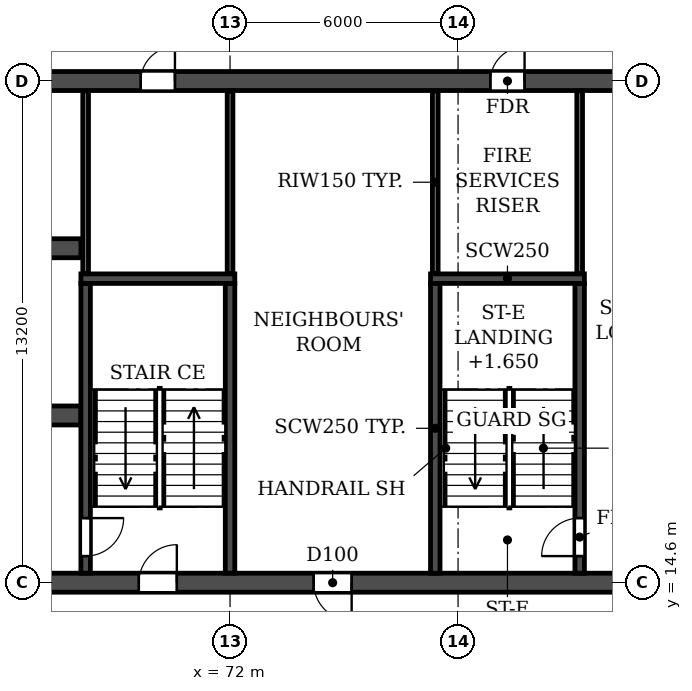
"""IFC4 building model, lengths in metres.
Left out: names, types, materials, properties, quantities, classifications, styles, units other than length and angle.
Written with IfcOpenShell. Run it as: python <this file> out.ifc"""

import sys

from ifc_helpers import new_model, si_unit, direction, frame, frame_2d, origin, place, context, subcontext, project, spatial, rectangle, extrude, element, fill, save


model = new_model("IFC4")
c1 = context("Model", 3, precision=1e-05, world=origin(), true_north=direction((0.0, 1.0)))
c2 = subcontext(c1, "Body", "Model", "MODEL_VIEW")
j1 = project(units=[si_unit("LENGTHUNIT", "METRE"), si_unit("PLANEANGLEUNIT", "RADIAN")], contexts=[c1])
p1 = place(None, origin())
s1 = spatial("IfcSite", under=j1, at=p1, CompositionType="ELEMENT")
p2 = place(p1, origin())
s2 = spatial("IfcBuilding", under=s1, at=p2, CompositionType="ELEMENT")
p3 = place(p2, frame((0.0, 0.0, 82.8)))
s3 = spatial("IfcBuildingStorey", under=s2, at=p3, CompositionType="ELEMENT", Elevation=82.8)
p4 = place(p3, frame((8.6, 14.6, 0.0), z_axis=(0.0, 0.0, 1.0), x_axis=(1.0, 0.0, 0.0)))
e1 = element("IfcWall", 1, at=p4, inside=s3, PredefinedType="SOLIDWALL", context=c2, shape_type="SweptSolid", body=[
    extrude(rectangle(XDim=84.8, YDim=0.5, at=frame_2d((42.4, 0.0))), origin(), (0.0, 0.0, 1.0), 3.06),
])
p5 = place(p4, frame((1.2, 0.0, 0.0)))
e2 = element("IfcOpeningElement", 2, at=p5, cuts=e1, PredefinedType="OPENING", context=c2, shape_type="SweptSolid", body=[
    extrude(rectangle(XDim=1.0, YDim=2.1, at=frame_2d((0.5, 1.05))), frame((0.0, 0.26, 0.0), z_axis=(0.0, -1.0, 0.0), x_axis=(1.0, 0.0, 0.0)), (0.0, 0.0, 1.0), 0.52),
])
p6 = place(p4, frame((5.9, 0.0, 0.0)))
e3 = element("IfcOpeningElement", 3, at=p6, cuts=e1, PredefinedType="OPENING", context=c2, shape_type="SweptSolid", body=[
    extrude(rectangle(XDim=1.0, YDim=2.1, at=frame_2d((0.5, 1.05))), frame((0.0, 0.26, 0.0), z_axis=(0.0, -1.0, 0.0), x_axis=(1.0, 0.0, 0.0)), (0.0, 0.0, 1.0), 0.52),
])
p7 = place(p4, frame((10.3, 0.0, 0.0)))
e4 = element("IfcOpeningElement", 4, at=p7, cuts=e1, PredefinedType="OPENING", context=c2, shape_type="SweptSolid", body=[
    extrude(rectangle(XDim=1.0, YDim=2.1, at=frame_2d((0.5, 1.05))), frame((0.0, 0.26, 0.0), z_axis=(0.0, -1.0, 0.0), x_axis=(1.0, 0.0, 0.0)), (0.0, 0.0, 1.0), 0.52),
])
p8 = place(p4, frame((18.2, 0.0, 0.0)))
e5 = element("IfcOpeningElement", 5, at=p8, cuts=e1, PredefinedType="OPENING", context=c2, shape_type="SweptSolid", body=[
    extrude(rectangle(XDim=1.0, YDim=2.1, at=frame_2d((0.5, 1.05))), frame((0.0, 0.26, 0.0), z_axis=(0.0, -1.0, 0.0), x_axis=(1.0, 0.0, 0.0)), (0.0, 0.0, 1.0), 0.52),
])
p9 = place(p4, frame((22.8, 0.0, 0.0)))
e6 = element("IfcOpeningElement", 6, at=p9, cuts=e1, PredefinedType="OPENING", context=c2, shape_type="SweptSolid", body=[
    extrude(rectangle(XDim=1.0, YDim=2.1, at=frame_2d((0.5, 1.05))), frame((0.0, 0.26, 0.0), z_axis=(0.0, -1.0, 0.0), x_axis=(1.0, 0.0, 0.0)), (0.0, 0.0, 1.0), 0.52),
])
p10 = place(p4, frame((36.7, 0.0, 0.0)))
e7 = element("IfcOpeningElement", 7, at=p10, cuts=e1, PredefinedType="OPENING", context=c2, shape_type="SweptSolid", body=[
    extrude(rectangle(XDim=1.0, YDim=2.1, at=frame_2d((0.5, 1.05))), frame((0.0, 0.26, 0.0), z_axis=(0.0, -1.0, 0.0), x_axis=(1.0, 0.0, 0.0)), (0.0, 0.0, 1.0), 0.52),
])
p11 = place(p4, frame((41.9, 0.0, 0.0)))
e8 = element("IfcOpeningElement", 8, at=p11, cuts=e1, PredefinedType="OPENING", context=c2, shape_type="SweptSolid", body=[
    extrude(rectangle(XDim=1.0, YDim=2.1, at=frame_2d((0.5, 1.05))), frame((0.0, 0.26, 0.0), z_axis=(0.0, -1.0, 0.0), x_axis=(1.0, 0.0, 0.0)), (0.0, 0.0, 1.0), 0.52),
])
p12 = place(p4, frame((44.5, 0.0, 0.0)))
e9 = element("IfcOpeningElement", 9, at=p12, cuts=e1, PredefinedType="OPENING", context=c2, shape_type="SweptSolid", body=[
    extrude(rectangle(XDim=1.0, YDim=2.1, at=frame_2d((0.5, 1.05))), frame((0.0, 0.26, 0.0), z_axis=(0.0, -1.0, 0.0), x_axis=(1.0, 0.0, 0.0)), (0.0, 0.0, 1.0), 0.52),
])
p13 = place(p4, frame((48.4, 0.0, 0.0)))
e10 = element("IfcOpeningElement", 10, at=p13, cuts=e1, PredefinedType="OPENING", context=c2, shape_type="SweptSolid", body=[
    extrude(rectangle(XDim=1.0, YDim=2.1, at=frame_2d((0.5, 1.05))), frame((0.0, 0.26, 0.0), z_axis=(0.0, -1.0, 0.0), x_axis=(1.0, 0.0, 0.0)), (0.0, 0.0, 1.0), 0.52),
])
p14 = place(p4, frame((61.0, 0.0, 0.0)))
e11 = element("IfcOpeningElement", 11, at=p14, cuts=e1, PredefinedType="OPENING", context=c2, shape_type="SweptSolid", body=[
    extrude(rectangle(XDim=1.0, YDim=2.1, at=frame_2d((0.5, 1.05))), frame((0.0, 0.26, 0.0), z_axis=(0.0, -1.0, 0.0), x_axis=(1.0, 0.0, 0.0)), (0.0, 0.0, 1.0), 0.52),
])
p15 = place(p4, frame((65.6, 0.0, 0.0)))
e12 = element("IfcOpeningElement", 12, at=p15, cuts=e1, PredefinedType="OPENING", context=c2, shape_type="SweptSolid", body=[
    extrude(rectangle(XDim=1.0, YDim=2.1, at=frame_2d((0.5, 1.05))), frame((0.0, 0.26, 0.0), z_axis=(0.0, -1.0, 0.0), x_axis=(1.0, 0.0, 0.0)), (0.0, 0.0, 1.0), 0.52),
])
p16 = place(p4, frame((73.5, 0.0, 0.0)))
e13 = element("IfcOpeningElement", 13, at=p16, cuts=e1, PredefinedType="OPENING", context=c2, shape_type="SweptSolid", body=[
    extrude(rectangle(XDim=1.0, YDim=2.1, at=frame_2d((0.5, 1.05))), frame((0.0, 0.26, 0.0), z_axis=(0.0, -1.0, 0.0), x_axis=(1.0, 0.0, 0.0)), (0.0, 0.0, 1.0), 0.52),
])
p17 = place(p4, frame((77.3, 0.0, 0.0)))
e14 = element("IfcOpeningElement", 14, at=p17, cuts=e1, PredefinedType="OPENING", context=c2, shape_type="SweptSolid", body=[
    extrude(rectangle(XDim=1.0, YDim=2.1, at=frame_2d((0.5, 1.05))), frame((0.0, 0.26, 0.0), z_axis=(0.0, -1.0, 0.0), x_axis=(1.0, 0.0, 0.0)), (0.0, 0.0, 1.0), 0.52),
])
p18 = place(p4, frame((82.0, 0.0, 0.0)))
e15 = element("IfcOpeningElement", 15, at=p18, cuts=e1, PredefinedType="OPENING", context=c2, shape_type="SweptSolid", body=[
    extrude(rectangle(XDim=1.0, YDim=2.1, at=frame_2d((0.5, 1.05))), frame((0.0, 0.26, 0.0), z_axis=(0.0, -1.0, 0.0), x_axis=(1.0, 0.0, 0.0)), (0.0, 0.0, 1.0), 0.52),
])
p19 = place(p3, frame((8.6, 27.8, 0.0), z_axis=(0.0, 0.0, 1.0), x_axis=(1.0, 0.0, 0.0)))
e16 = element("IfcWall", 16, at=p19, inside=s3, PredefinedType="SOLIDWALL", context=c2, shape_type="SweptSolid", body=[
    extrude(rectangle(XDim=84.8, YDim=0.5, at=frame_2d((42.4, 0.0))), origin(), (0.0, 0.0, 1.0), 3.06),
])
p20 = place(p19, frame((2.55, 0.0, 0.0)))
e17 = element("IfcOpeningElement", 17, at=p20, cuts=e16, PredefinedType="OPENING", context=c2, shape_type="SweptSolid", body=[
    extrude(rectangle(XDim=1.0, YDim=2.1, at=frame_2d((0.5, 1.05))), frame((0.0, 0.26, 0.0), z_axis=(0.0, -1.0, 0.0), x_axis=(1.0, 0.0, 0.0)), (0.0, 0.0, 1.0), 0.52),
])
p21 = place(p19, frame((7.25, 0.0, 0.0)))
e18 = element("IfcOpeningElement", 18, at=p21, cuts=e16, PredefinedType="OPENING", context=c2, shape_type="SweptSolid", body=[
    extrude(rectangle(XDim=1.0, YDim=2.1, at=frame_2d((0.5, 1.05))), frame((0.0, 0.26, 0.0), z_axis=(0.0, -1.0, 0.0), x_axis=(1.0, 0.0, 0.0)), (0.0, 0.0, 1.0), 0.52),
])
p22 = place(p19, frame((10.3, 0.0, 0.0)))
e19 = element("IfcOpeningElement", 19, at=p22, cuts=e16, PredefinedType="OPENING", context=c2, shape_type="SweptSolid", body=[
    extrude(rectangle(XDim=1.0, YDim=2.1, at=frame_2d((0.5, 1.05))), frame((0.0, 0.26, 0.0), z_axis=(0.0, -1.0, 0.0), x_axis=(1.0, 0.0, 0.0)), (0.0, 0.0, 1.0), 0.52),
])
p23 = place(p19, frame((13.65, 0.0, 0.0)))
e20 = element("IfcOpeningElement", 20, at=p23, cuts=e16, PredefinedType="OPENING", context=c2, shape_type="SweptSolid", body=[
    extrude(rectangle(XDim=0.9, YDim=2.1, at=frame_2d((0.45, 1.05))), frame((0.0, 0.26, 0.0), z_axis=(0.0, -1.0, 0.0), x_axis=(1.0, 0.0, 0.0)), (0.0, 0.0, 1.0), 0.52),
])
p24 = place(p19, frame((22.85, 0.0, 0.0)))
e21 = element("IfcOpeningElement", 21, at=p24, cuts=e16, PredefinedType="OPENING", context=c2, shape_type="SweptSolid", body=[
    extrude(rectangle(XDim=0.9, YDim=2.1, at=frame_2d((0.45, 1.05))), frame((0.0, 0.26, 0.0), z_axis=(0.0, -1.0, 0.0), x_axis=(1.0, 0.0, 0.0)), (0.0, 0.0, 1.0), 0.52),
])
p25 = place(p19, frame((27.3, 0.0, 0.0)))
e22 = element("IfcOpeningElement", 22, at=p25, cuts=e16, PredefinedType="OPENING", context=c2, shape_type="SweptSolid", body=[
    extrude(rectangle(XDim=1.0, YDim=2.1, at=frame_2d((0.5, 1.05))), frame((0.0, 0.26, 0.0), z_axis=(0.0, -1.0, 0.0), x_axis=(1.0, 0.0, 0.0)), (0.0, 0.0, 1.0), 0.52),
])
p26 = place(p19, frame((32.25, 0.0, 0.0)))
e23 = element("IfcOpeningElement", 23, at=p26, cuts=e16, PredefinedType="OPENING", context=c2, shape_type="SweptSolid", body=[
    extrude(rectangle(XDim=1.5, YDim=2.1, at=frame_2d((0.75, 1.05))), frame((0.0, 0.26, 0.0), z_axis=(0.0, -1.0, 0.0), x_axis=(1.0, 0.0, 0.0)), (0.0, 0.0, 1.0), 0.52),
])
p27 = place(p19, frame((39.0, 0.0, 0.0)))
e24 = element("IfcOpeningElement", 24, at=p27, cuts=e16, PredefinedType="OPENING", context=c2, shape_type="SweptSolid", body=[
    extrude(rectangle(XDim=1.0, YDim=2.1, at=frame_2d((0.5, 1.05))), frame((0.0, 0.26, 0.0), z_axis=(0.0, -1.0, 0.0), x_axis=(1.0, 0.0, 0.0)), (0.0, 0.0, 1.0), 0.52),
])
p28 = place(p19, frame((41.9, 0.0, 0.0)))
e25 = element("IfcOpeningElement", 25, at=p28, cuts=e16, PredefinedType="OPENING", context=c2, shape_type="SweptSolid", body=[
    extrude(rectangle(XDim=1.0, YDim=2.1, at=frame_2d((0.5, 1.05))), frame((0.0, 0.26, 0.0), z_axis=(0.0, -1.0, 0.0), x_axis=(1.0, 0.0, 0.0)), (0.0, 0.0, 1.0), 0.52),
])
p29 = place(p19, frame((47.4, 0.0, 0.0)))
e26 = element("IfcOpeningElement", 26, at=p29, cuts=e16, PredefinedType="OPENING", context=c2, shape_type="SweptSolid", body=[
    extrude(rectangle(XDim=1.0, YDim=2.1, at=frame_2d((0.5, 1.05))), frame((0.0, 0.26, 0.0), z_axis=(0.0, -1.0, 0.0), x_axis=(1.0, 0.0, 0.0)), (0.0, 0.0, 1.0), 0.52),
])
p30 = place(p19, frame((52.6, 0.0, 0.0)))
e27 = element("IfcOpeningElement", 27, at=p30, cuts=e16, PredefinedType="OPENING", context=c2, shape_type="SweptSolid", body=[
    extrude(rectangle(XDim=1.0, YDim=2.1, at=frame_2d((0.5, 1.05))), frame((0.0, 0.26, 0.0), z_axis=(0.0, -1.0, 0.0), x_axis=(1.0, 0.0, 0.0)), (0.0, 0.0, 1.0), 0.52),
])
p31 = place(p19, frame((56.5, 0.0, 0.0)))
e28 = element("IfcOpeningElement", 28, at=p31, cuts=e16, PredefinedType="OPENING", context=c2, shape_type="SweptSolid", body=[
    extrude(rectangle(XDim=1.0, YDim=2.1, at=frame_2d((0.5, 1.05))), frame((0.0, 0.26, 0.0), z_axis=(0.0, -1.0, 0.0), x_axis=(1.0, 0.0, 0.0)), (0.0, 0.0, 1.0), 0.52),
])
p32 = place(p19, frame((61.05, 0.0, 0.0)))
e29 = element("IfcOpeningElement", 29, at=p32, cuts=e16, PredefinedType="OPENING", context=c2, shape_type="SweptSolid", body=[
    extrude(rectangle(XDim=0.9, YDim=2.1, at=frame_2d((0.45, 1.05))), frame((0.0, 0.26, 0.0), z_axis=(0.0, -1.0, 0.0), x_axis=(1.0, 0.0, 0.0)), (0.0, 0.0, 1.0), 0.52),
])
p33 = place(p19, frame((70.25, 0.0, 0.0)))
e30 = element("IfcOpeningElement", 30, at=p33, cuts=e16, PredefinedType="OPENING", context=c2, shape_type="SweptSolid", body=[
    extrude(rectangle(XDim=0.9, YDim=2.1, at=frame_2d((0.45, 1.05))), frame((0.0, 0.26, 0.0), z_axis=(0.0, -1.0, 0.0), x_axis=(1.0, 0.0, 0.0)), (0.0, 0.0, 1.0), 0.52),
])
p34 = place(p19, frame((73.5, 0.0, 0.0)))
e31 = element("IfcOpeningElement", 31, at=p34, cuts=e16, PredefinedType="OPENING", context=c2, shape_type="SweptSolid", body=[
    extrude(rectangle(XDim=1.0, YDim=2.1, at=frame_2d((0.5, 1.05))), frame((0.0, 0.26, 0.0), z_axis=(0.0, -1.0, 0.0), x_axis=(1.0, 0.0, 0.0)), (0.0, 0.0, 1.0), 0.52),
])
p35 = place(p19, frame((76.55, 0.0, 0.0)))
e32 = element("IfcOpeningElement", 32, at=p35, cuts=e16, PredefinedType="OPENING", context=c2, shape_type="SweptSolid", body=[
    extrude(rectangle(XDim=1.0, YDim=2.1, at=frame_2d((0.5, 1.05))), frame((0.0, 0.26, 0.0), z_axis=(0.0, -1.0, 0.0), x_axis=(1.0, 0.0, 0.0)), (0.0, 0.0, 1.0), 0.52),
])
p36 = place(p19, frame((81.25, 0.0, 0.0)))
e33 = element("IfcOpeningElement", 33, at=p36, cuts=e16, PredefinedType="OPENING", context=c2, shape_type="SweptSolid", body=[
    extrude(rectangle(XDim=1.0, YDim=2.1, at=frame_2d((0.5, 1.05))), frame((0.0, 0.26, 0.0), z_axis=(0.0, -1.0, 0.0), x_axis=(1.0, 0.0, 0.0)), (0.0, 0.0, 1.0), 0.52),
])
p37 = place(p3, frame((33.925, 19.0, 0.0), z_axis=(0.0, 0.0, 1.0), x_axis=(1.0, 0.0, 0.0)))
e34 = element("IfcWall", 34, at=p37, inside=s3, PredefinedType="SOLIDWALL", context=c2, shape_type="SweptSolid", body=[
    extrude(rectangle(XDim=34.15, YDim=0.5, at=frame_2d((17.075, 0.0))), origin(), (0.0, 0.0, 1.0), 3.06),
])
p38 = place(p37, frame((16.175, 0.0, 0.0)))
e35 = element("IfcOpeningElement", 35, at=p38, cuts=e34, PredefinedType="OPENING", context=c2, shape_type="SweptSolid", body=[
    extrude(rectangle(XDim=1.8, YDim=2.1, at=frame_2d((0.9, 1.05))), frame((0.0, 0.26, 0.0), z_axis=(0.0, -1.0, 0.0), x_axis=(1.0, 0.0, 0.0)), (0.0, 0.0, 1.0), 0.52),
])
p39 = place(p37, frame((1.525, 0.0, 0.0)))
e36 = element("IfcOpeningElement", 36, at=p39, cuts=e34, PredefinedType="OPENING", context=c2, shape_type="SweptSolid", body=[
    extrude(rectangle(XDim=1.8, YDim=2.1, at=frame_2d((0.9, 1.05))), frame((0.0, 0.26, 0.0), z_axis=(0.0, -1.0, 0.0), x_axis=(1.0, 0.0, 0.0)), (0.0, 0.0, 1.0), 0.52),
])
p40 = place(p37, frame((8.725, 0.0, 0.0)))
e37 = element("IfcOpeningElement", 37, at=p40, cuts=e34, PredefinedType="OPENING", context=c2, shape_type="SweptSolid", body=[
    extrude(rectangle(XDim=1.1, YDim=2.1, at=frame_2d((0.55, 1.05))), frame((0.0, 0.26, 0.0), z_axis=(0.0, -1.0, 0.0), x_axis=(1.0, 0.0, 0.0)), (0.0, 0.0, 1.0), 0.52),
])
p41 = place(p37, frame((11.325, 0.0, 0.0)))
e38 = element("IfcOpeningElement", 38, at=p41, cuts=e34, PredefinedType="OPENING", context=c2, shape_type="SweptSolid", body=[
    extrude(rectangle(XDim=1.1, YDim=2.1, at=frame_2d((0.55, 1.05))), frame((0.0, 0.26, 0.0), z_axis=(0.0, -1.0, 0.0), x_axis=(1.0, 0.0, 0.0)), (0.0, 0.0, 1.0), 0.52),
])
p42 = place(p37, frame((13.925, 0.0, 0.0)))
e39 = element("IfcOpeningElement", 39, at=p42, cuts=e34, PredefinedType="OPENING", context=c2, shape_type="SweptSolid", body=[
    extrude(rectangle(XDim=1.1, YDim=2.1, at=frame_2d((0.55, 1.05))), frame((0.0, 0.26, 0.0), z_axis=(0.0, -1.0, 0.0), x_axis=(1.0, 0.0, 0.0)), (0.0, 0.0, 1.0), 0.52),
])
p43 = place(p37, frame((19.125, 0.0, 0.0)))
e40 = element("IfcOpeningElement", 40, at=p43, cuts=e34, PredefinedType="OPENING", context=c2, shape_type="SweptSolid", body=[
    extrude(rectangle(XDim=1.1, YDim=2.1, at=frame_2d((0.55, 1.05))), frame((0.0, 0.26, 0.0), z_axis=(0.0, -1.0, 0.0), x_axis=(1.0, 0.0, 0.0)), (0.0, 0.0, 1.0), 0.52),
])
p44 = place(p37, frame((21.725, 0.0, 0.0)))
e41 = element("IfcOpeningElement", 41, at=p44, cuts=e34, PredefinedType="OPENING", context=c2, shape_type="SweptSolid", body=[
    extrude(rectangle(XDim=1.1, YDim=2.1, at=frame_2d((0.55, 1.05))), frame((0.0, 0.26, 0.0), z_axis=(0.0, -1.0, 0.0), x_axis=(1.0, 0.0, 0.0)), (0.0, 0.0, 1.0), 0.52),
])
p45 = place(p37, frame((24.325, 0.0, 0.0)))
e42 = element("IfcOpeningElement", 42, at=p45, cuts=e34, PredefinedType="OPENING", context=c2, shape_type="SweptSolid", body=[
    extrude(rectangle(XDim=1.1, YDim=2.1, at=frame_2d((0.55, 1.05))), frame((0.0, 0.26, 0.0), z_axis=(0.0, -1.0, 0.0), x_axis=(1.0, 0.0, 0.0)), (0.0, 0.0, 1.0), 0.52),
])
p46 = place(p37, frame((30.825, 0.0, 0.0)))
e43 = element("IfcOpeningElement", 43, at=p46, cuts=e34, PredefinedType="OPENING", context=c2, shape_type="SweptSolid", body=[
    extrude(rectangle(XDim=1.8, YDim=2.1, at=frame_2d((0.9, 1.05))), frame((0.0, 0.26, 0.0), z_axis=(0.0, -1.0, 0.0), x_axis=(1.0, 0.0, 0.0)), (0.0, 0.0, 1.0), 0.52),
])
p47 = place(p3, frame((33.925, 23.4, 0.0), z_axis=(0.0, 0.0, 1.0), x_axis=(1.0, 0.0, 0.0)))
e44 = element("IfcWall", 44, at=p47, inside=s3, PredefinedType="SOLIDWALL", context=c2, shape_type="SweptSolid", body=[
    extrude(rectangle(XDim=34.15, YDim=0.5, at=frame_2d((17.075, 0.0))), origin(), (0.0, 0.0, 1.0), 3.06),
])
p48 = place(p47, frame((16.175, 0.0, 0.0)))
e45 = element("IfcOpeningElement", 45, at=p48, cuts=e44, PredefinedType="OPENING", context=c2, shape_type="SweptSolid", body=[
    extrude(rectangle(XDim=1.8, YDim=2.1, at=frame_2d((0.9, 1.05))), frame((0.0, 0.26, 0.0), z_axis=(0.0, -1.0, 0.0), x_axis=(1.0, 0.0, 0.0)), (0.0, 0.0, 1.0), 0.52),
])
p49 = place(p47, frame((11.025, 0.0, 0.0)))
e46 = element("IfcOpeningElement", 46, at=p49, cuts=e44, PredefinedType="OPENING", context=c2, shape_type="SweptSolid", body=[
    extrude(rectangle(XDim=1.1, YDim=2.1, at=frame_2d((0.55, 1.05))), frame((0.0, 0.26, 0.0), z_axis=(0.0, -1.0, 0.0), x_axis=(1.0, 0.0, 0.0)), (0.0, 0.0, 1.0), 0.52),
])
p50 = place(p3, frame((68.2, 14.85, 0.0), z_axis=(0.0, 0.0, 1.0), x_axis=(0.0, 1.0, 0.0)))
e47 = element("IfcWall", 47, at=p50, inside=s3, PredefinedType="SOLIDWALL", context=c2, shape_type="SweptSolid", body=[
    extrude(rectangle(XDim=7.625, YDim=0.25, at=frame_2d((3.812, 0.0))), origin(), (0.0, 0.0, 1.0), 3.06),
])
p51 = place(p50, frame((0.45, 0.0, 0.0)))
e48 = element("IfcOpeningElement", 48, at=p51, cuts=e47, PredefinedType="OPENING", context=c2, shape_type="SweptSolid", body=[
    extrude(rectangle(XDim=1.0, YDim=2.1, at=frame_2d((0.5, 1.05))), frame((0.0, 0.135, 0.0), z_axis=(0.0, -1.0, 0.0), x_axis=(1.0, 0.0, 0.0)), (0.0, 0.0, 1.0), 0.27),
])
p52 = place(p3, frame((72.0, 14.85, 0.0), z_axis=(0.0, 0.0, 1.0), x_axis=(0.0, 1.0, 0.0)))
e49 = element("IfcWall", 49, at=p52, inside=s3, PredefinedType="SOLIDWALL", context=c2, shape_type="SweptSolid", body=[
    extrude(rectangle(XDim=7.625, YDim=0.25, at=frame_2d((3.812, 0.0))), origin(), (0.0, 0.0, 1.0), 3.06),
])
p53 = place(p3, frame((68.075, 22.6, 0.0), z_axis=(0.0, 0.0, 1.0), x_axis=(1.0, 0.0, 0.0)))
e50 = element("IfcWall", 50, at=p53, inside=s3, PredefinedType="SOLIDWALL", context=c2, shape_type="SweptSolid", body=[
    extrude(rectangle(XDim=4.05, YDim=0.25, at=frame_2d((2.025, 0.0))), origin(), (0.0, 0.0, 1.0), 3.06),
])
p54 = place(p3, frame((77.4, 14.85, 0.0), z_axis=(0.0, 0.0, 1.0), x_axis=(0.0, 1.0, 0.0)))
e51 = element("IfcWall", 51, at=p54, inside=s3, PredefinedType="SOLIDWALL", context=c2, shape_type="SweptSolid", body=[
    extrude(rectangle(XDim=7.625, YDim=0.25, at=frame_2d((3.812, 0.0))), origin(), (0.0, 0.0, 1.0), 3.06),
])
p55 = place(p3, frame((81.2, 14.85, 0.0), z_axis=(0.0, 0.0, 1.0), x_axis=(0.0, 1.0, 0.0)))
e52 = element("IfcWall", 52, at=p55, inside=s3, PredefinedType="SOLIDWALL", context=c2, shape_type="SweptSolid", body=[
    extrude(rectangle(XDim=7.625, YDim=0.25, at=frame_2d((3.812, 0.0))), origin(), (0.0, 0.0, 1.0), 3.06),
])
p56 = place(p55, frame((0.45, 0.0, 0.0)))
e53 = element("IfcOpeningElement", 53, at=p56, cuts=e52, PredefinedType="OPENING", context=c2, shape_type="SweptSolid", body=[
    extrude(rectangle(XDim=1.0, YDim=2.1, at=frame_2d((0.5, 1.05))), frame((0.0, 0.135, 0.0), z_axis=(0.0, -1.0, 0.0), x_axis=(1.0, 0.0, 0.0)), (0.0, 0.0, 1.0), 0.27),
])
p57 = place(p3, frame((77.275, 22.6, 0.0), z_axis=(0.0, 0.0, 1.0), x_axis=(1.0, 0.0, 0.0)))
e54 = element("IfcWall", 54, at=p57, inside=s3, PredefinedType="SOLIDWALL", context=c2, shape_type="SweptSolid", body=[
    extrude(rectangle(XDim=4.05, YDim=0.25, at=frame_2d((2.025, 0.0))), origin(), (0.0, 0.0, 1.0), 3.06),
])
for number, where, z_axis, x_axis in (
    (55, (68.2, 22.735, 0.0), (0.0, 0.0, 1.0), (0.0, 1.0, 0.0)),
    (56, (72.0, 22.735, 0.0), (0.0, 0.0, 1.0), (0.0, 1.0, 0.0)),
    (57, (77.4, 22.735, 0.0), (0.0, 0.0, 1.0), (0.0, 1.0, 0.0)),
    (58, (81.2, 22.735, 0.0), (0.0, 0.0, 1.0), (0.0, 1.0, 0.0)),
):
    element("IfcWall", number, at=place(p3, frame(where, z_axis=z_axis, x_axis=x_axis)), inside=s3, PredefinedType="PARTITIONING", context=c2, shape_type="SweptSolid", body=[
        extrude(rectangle(XDim=4.805, YDim=0.15, at=frame_2d((2.402, 0.0))), origin(), (0.0, 0.0, 1.0), 3.06),
    ])
p58 = place(p32, origin())
e59 = element("IfcDoor", 59, at=p58, inside=s3, OperationType="SINGLE_SWING_RIGHT", PredefinedType="DOOR", context=c2, shape_type="SweptSolid", body=[
    extrude(rectangle(XDim=0.9, YDim=2.1, at=frame_2d((0.45, 1.05))), frame((0.0, 0.025, 0.0), z_axis=(0.0, -1.0, 0.0), x_axis=(1.0, 0.0, 0.0)), (0.0, 0.0, 1.0), 0.05),
])
fill(e29, e59)
p59 = place(p33, origin())
e60 = element("IfcDoor", 60, at=p59, inside=s3, OperationType="SINGLE_SWING_RIGHT", PredefinedType="DOOR", context=c2, shape_type="SweptSolid", body=[
    extrude(rectangle(XDim=0.9, YDim=2.1, at=frame_2d((0.45, 1.05))), frame((0.0, 0.025, 0.0), z_axis=(0.0, -1.0, 0.0), x_axis=(1.0, 0.0, 0.0)), (0.0, 0.0, 1.0), 0.05),
])
fill(e30, e60)
p60 = place(p14, origin())
e61 = element("IfcDoor", 61, at=p60, inside=s3, OperationType="SINGLE_SWING_RIGHT", PredefinedType="DOOR", context=c2, shape_type="SweptSolid", body=[
    extrude(rectangle(XDim=1.0, YDim=2.1, at=frame_2d((0.5, 1.05))), frame((0.0, 0.025, 0.0), z_axis=(0.0, -1.0, 0.0), x_axis=(1.0, 0.0, 0.0)), (0.0, 0.0, 1.0), 0.05),
])
fill(e11, e61)
p61 = place(p15, frame((1.0, 0.0, 0.0), z_axis=(0.0, 0.0, 1.0), x_axis=(-1.0, 0.0, 0.0)))
e62 = element("IfcDoor", 62, at=p61, inside=s3, OperationType="SINGLE_SWING_LEFT", PredefinedType="DOOR", context=c2, shape_type="SweptSolid", body=[
    extrude(rectangle(XDim=1.0, YDim=2.1, at=frame_2d((0.5, 1.05))), frame((0.0, 0.025, 0.0), z_axis=(0.0, -1.0, 0.0), x_axis=(1.0, 0.0, 0.0)), (0.0, 0.0, 1.0), 0.05),
])
fill(e12, e62)
p62 = place(p51, frame((1.0, 0.0, 0.0), z_axis=(0.0, 0.0, 1.0), x_axis=(-1.0, 0.0, 0.0)))
e63 = element("IfcDoor", 63, at=p62, inside=s3, OperationType="SINGLE_SWING_LEFT", PredefinedType="DOOR", context=c2, shape_type="SweptSolid", body=[
    extrude(rectangle(XDim=1.0, YDim=2.1, at=frame_2d((0.5, 1.05))), frame((0.0, 0.025, 0.0), z_axis=(0.0, -1.0, 0.0), x_axis=(1.0, 0.0, 0.0)), (0.0, 0.0, 1.0), 0.05),
])
fill(e48, e63)
p63 = place(p56, origin())
e64 = element("IfcDoor", 64, at=p63, inside=s3, OperationType="SINGLE_SWING_LEFT", PredefinedType="DOOR", context=c2, shape_type="SweptSolid", body=[
    extrude(rectangle(XDim=1.0, YDim=2.1, at=frame_2d((0.5, 1.05))), frame((0.0, 0.025, 0.0), z_axis=(0.0, -1.0, 0.0), x_axis=(1.0, 0.0, 0.0)), (0.0, 0.0, 1.0), 0.05),
])
fill(e53, e64)
save(model, sys.argv[1])
